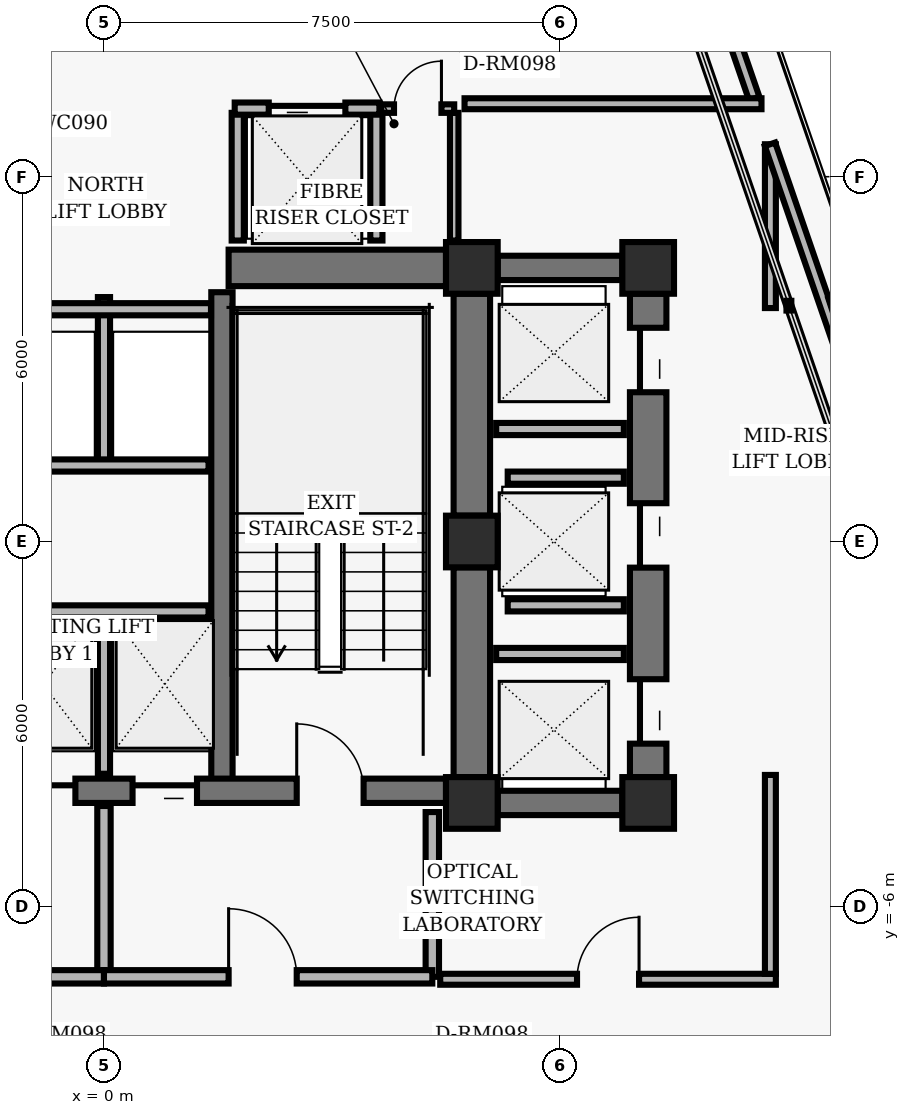
"""IFC4 building model, lengths in metres.
Left out: names, types, materials, properties, quantities, classifications, styles, units other than length and angle.
Written with IfcOpenShell. Run it as: python <this file> out.ifc"""

import sys

from ifc_helpers import new_model, si_unit, direction, frame, frame_2d, origin, origin_2d, place, context, subcontext, project, spatial, rectangle, hollow_rectangle, extrude, element, fill, save


model = new_model("IFC4")
c1 = context("Model", 3, precision=1e-05, world=origin(), true_north=direction((0.0, 1.0)))
c2 = subcontext(c1, "Body", "Model", "MODEL_VIEW")
j1 = project(units=[si_unit("LENGTHUNIT", "METRE"), si_unit("PLANEANGLEUNIT", "RADIAN")], contexts=[c1])
p1 = place(None, origin())
s1 = spatial("IfcSite", under=j1, at=p1, CompositionType="ELEMENT")
p2 = place(p1, origin())
s2 = spatial("IfcBuilding", under=s1, at=p2, CompositionType="ELEMENT")
p3 = place(p2, frame((0.0, 0.0, 150.24)))
s3 = spatial("IfcBuildingStorey", under=s2, at=p3, CompositionType="ELEMENT", Elevation=150.24)
for number, where, z_axis, x_axis in (
    (1, (6.05, 4.5, 0.0), (0.0, 0.0, 1.0), (1.0, 0.0, 0.0)),
    (2, (6.05, 0.0, 0.0), (0.0, 0.0, 1.0), (1.0, 0.0, 0.0)),
    (3, (6.05, -4.3, 0.0), (0.0, 0.0, 1.0), (1.0, 0.0, 0.0)),
    (4, (8.95, 4.5, 0.0), (0.0, 0.0, 1.0), (1.0, 0.0, 0.0)),
    (5, (8.95, -4.3, 0.0), (0.0, 0.0, 1.0), (1.0, 0.0, 0.0)),
):
    element("IfcColumn", number, at=place(p3, frame(where, z_axis=z_axis, x_axis=x_axis)), inside=s3, PredefinedType="COLUMN", context=c2, shape_type="SweptSolid", body=[
        extrude(hollow_rectangle(XDim=0.85, YDim=0.85, WallThickness=0.055, InnerFilletRadius=0.02, OuterFilletRadius=0.04, at=origin_2d()), origin(), (0.0, 0.0, 1.0), 3.04),
    ])
p4 = place(p3, frame((6.05, 0.425, 0.0), z_axis=(0.0, 0.0, 1.0), x_axis=(0.0, 1.0, 0.0)))
e6 = element("IfcWall", 6, at=p4, inside=s3, PredefinedType="SHEAR", context=c2, shape_type="SweptSolid", body=[
    extrude(rectangle(XDim=3.65, YDim=0.6, at=frame_2d((1.825, 0.0))), origin(), (0.0, 0.0, 1.0), 2.788),
])
p5 = place(p3, frame((6.05, -3.875, 0.0), z_axis=(0.0, 0.0, 1.0), x_axis=(0.0, 1.0, 0.0)))
e7 = element("IfcWall", 7, at=p5, inside=s3, PredefinedType="SHEAR", context=c2, shape_type="SweptSolid", body=[
    extrude(rectangle(XDim=3.45, YDim=0.6, at=frame_2d((1.725, 0.0))), origin(), (0.0, 0.0, 1.0), 2.788),
])
p6 = place(p3, frame((1.94, -4.1, 0.0), z_axis=(0.0, 0.0, 1.0), x_axis=(0.0, 1.0, 0.0)))
e8 = element("IfcWall", 8, at=p6, inside=s3, PredefinedType="SHEAR", context=c2, shape_type="SweptSolid", body=[
    extrude(rectangle(XDim=8.2, YDim=0.35, at=frame_2d((4.1, 0.0))), origin(), (0.0, 0.0, 1.0), 2.788),
])
p7 = place(p3, frame((-5.625, -4.1, 0.0), z_axis=(0.0, 0.0, 1.0), x_axis=(1.0, 0.0, 0.0)))
e9 = element("IfcWall", 9, at=p7, inside=s3, PredefinedType="SHEAR", context=c2, shape_type="SweptSolid", body=[
    extrude(rectangle(XDim=11.25, YDim=0.4, at=frame_2d((5.625, 0.0))), origin(), (0.0, 0.0, 1.0), 2.788),
])
p8 = place(p7, frame((1.355, 0.0, 0.0)))
e10 = element("IfcOpeningElement", 10, at=p8, cuts=e9, PredefinedType="OPENING", context=c2, shape_type="SweptSolid", body=[
    extrude(rectangle(XDim=1.1, YDim=2.04, at=frame_2d((0.55, 1.02))), frame((0.0, 0.21, 0.0), z_axis=(0.0, -1.0, 0.0), x_axis=(1.0, 0.0, 0.0)), (0.0, 0.0, 1.0), 0.42),
])
p9 = place(p7, frame((8.795, 0.0, 0.0)))
e11 = element("IfcOpeningElement", 11, at=p9, cuts=e9, PredefinedType="OPENING", context=c2, shape_type="SweptSolid", body=[
    extrude(rectangle(XDim=1.1, YDim=2.04, at=frame_2d((0.55, 1.02))), frame((0.0, 0.21, 0.0), z_axis=(0.0, -1.0, 0.0), x_axis=(1.0, 0.0, 0.0)), (0.0, 0.0, 1.0), 0.42),
])
p10 = place(p7, frame((4.095, 0.0, 0.0)))
e12 = element("IfcOpeningElement", 12, at=p10, cuts=e9, PredefinedType="OPENING", context=c2, shape_type="SweptSolid", body=[
    extrude(rectangle(XDim=1.06, YDim=2.04, at=frame_2d((0.53, 1.02))), frame((0.0, 0.21, 0.0), z_axis=(0.0, -1.0, 0.0), x_axis=(1.0, 0.0, 0.0)), (0.0, 0.0, 1.0), 0.42),
])
p11 = place(p7, frame((6.095, 0.0, 0.0)))
e13 = element("IfcOpeningElement", 13, at=p11, cuts=e9, PredefinedType="OPENING", context=c2, shape_type="SweptSolid", body=[
    extrude(rectangle(XDim=1.06, YDim=2.04, at=frame_2d((0.53, 1.02))), frame((0.0, 0.21, 0.0), z_axis=(0.0, -1.0, 0.0), x_axis=(1.0, 0.0, 0.0)), (0.0, 0.0, 1.0), 0.42),
])
p12 = place(p3, frame((2.05, 4.5, 0.0), z_axis=(0.0, 0.0, 1.0), x_axis=(1.0, 0.0, 0.0)))
e14 = element("IfcWall", 14, at=p12, inside=s3, PredefinedType="SHEAR", context=c2, shape_type="SweptSolid", body=[
    extrude(rectangle(XDim=3.575, YDim=0.6, at=frame_2d((1.788, 0.0))), origin(), (0.0, 0.0, 1.0), 2.788),
])
p13 = place(p3, frame((8.95, -3.875, 0.0), z_axis=(0.0, 0.0, 1.0), x_axis=(0.0, 1.0, 0.0)))
e15 = element("IfcWall", 15, at=p13, inside=s3, PredefinedType="SHEAR", context=c2, shape_type="SweptSolid", body=[
    extrude(rectangle(XDim=7.95, YDim=0.6, at=frame_2d((3.975, 0.0))), origin(), (0.0, 0.0, 1.0), 2.788),
])
p14 = place(p13, frame((0.55, 0.0, 0.0)))
e16 = element("IfcOpeningElement", 16, at=p14, cuts=e15, PredefinedType="OPENING", context=c2, shape_type="SweptSolid", body=[
    extrude(rectangle(XDim=1.06, YDim=2.04, at=frame_2d((0.53, 1.02))), frame((0.0, 0.31, 0.0), z_axis=(0.0, -1.0, 0.0), x_axis=(1.0, 0.0, 0.0)), (0.0, 0.0, 1.0), 0.62),
])
p15 = place(p13, frame((3.445, 0.0, 0.0)))
e17 = element("IfcOpeningElement", 17, at=p15, cuts=e15, PredefinedType="OPENING", context=c2, shape_type="SweptSolid", body=[
    extrude(rectangle(XDim=1.06, YDim=2.04, at=frame_2d((0.53, 1.02))), frame((0.0, 0.31, 0.0), z_axis=(0.0, -1.0, 0.0), x_axis=(1.0, 0.0, 0.0)), (0.0, 0.0, 1.0), 0.62),
])
p16 = place(p13, frame((6.33, 0.0, 0.0)))
e18 = element("IfcOpeningElement", 18, at=p16, cuts=e15, PredefinedType="OPENING", context=c2, shape_type="SweptSolid", body=[
    extrude(rectangle(XDim=1.06, YDim=2.04, at=frame_2d((0.53, 1.02))), frame((0.0, 0.31, 0.0), z_axis=(0.0, -1.0, 0.0), x_axis=(1.0, 0.0, 0.0)), (0.0, 0.0, 1.0), 0.62),
])
for number, where, z_axis, x_axis in (
    (19, (6.475, 4.5, 0.0), (0.0, 0.0, 1.0), (1.0, 0.0, 0.0)),
    (20, (6.475, -4.3, 0.0), (0.0, 0.0, 1.0), (1.0, 0.0, 0.0)),
):
    element("IfcWall", number, at=place(p3, frame(where, z_axis=z_axis, x_axis=x_axis)), inside=s3, PredefinedType="SHEAR", context=c2, shape_type="SweptSolid", body=[
        extrude(rectangle(XDim=2.05, YDim=0.4, at=frame_2d((1.025, 0.0))), origin(), (0.0, 0.0, 1.0), 2.788),
    ])
p17 = place(p3, frame((0.0, -3.82, 0.0), z_axis=(0.0, 0.0, 1.0), x_axis=(0.0, 1.0, 0.0)))
e21 = element("IfcWall", 21, at=p17, inside=s3, PredefinedType="PARTITIONING", context=c2, shape_type="SweptSolid", body=[
    extrude(rectangle(XDim=2.67, YDim=0.2, at=frame_2d((1.335, 0.0))), origin(), (0.0, 0.0, 1.0), 2.763),
])
p18 = place(p3, frame((-1.72, -1.15, 0.0), z_axis=(0.0, 0.0, 1.0), x_axis=(1.0, 0.0, 0.0)))
e22 = element("IfcWall", 22, at=p18, inside=s3, PredefinedType="PARTITIONING", context=c2, shape_type="SweptSolid", body=[
    extrude(rectangle(XDim=3.44, YDim=0.2, at=frame_2d((1.72, 0.0))), origin(), (0.0, 0.0, 1.0), 2.763),
])
p19 = place(p3, frame((5.4, -7.16, 0.0), z_axis=(0.0, 0.0, 1.0), x_axis=(0.0, 1.0, 0.0)))
e23 = element("IfcWall", 23, at=p19, inside=s3, PredefinedType="PARTITIONING", context=c2, shape_type="SweptSolid", body=[
    extrude(rectangle(XDim=2.71, YDim=0.22, at=frame_2d((1.355, 0.0))), origin(), (0.0, 0.0, 1.0), 2.763),
])
p20 = place(p3, frame((0.0, -7.16, 0.0), z_axis=(0.0, 0.0, 1.0), x_axis=(0.0, 1.0, 0.0)))
e24 = element("IfcWall", 24, at=p20, inside=s3, PredefinedType="PARTITIONING", context=c2, shape_type="SweptSolid", body=[
    extrude(rectangle(XDim=2.81, YDim=0.22, at=frame_2d((1.405, 0.0))), origin(), (0.0, 0.0, 1.0), 2.763),
])
p21 = place(p3, frame((-5.4, -7.16, 0.0), z_axis=(0.0, 0.0, 1.0), x_axis=(1.0, 0.0, 0.0)))
e25 = element("IfcWall", 25, at=p21, inside=s3, PredefinedType="PARTITIONING", context=c2, shape_type="SweptSolid", body=[
    extrude(rectangle(XDim=5.4, YDim=0.22, at=frame_2d((2.7, 0.0))), origin(), (0.0, 0.0, 1.0), 2.33),
])
p22 = place(p21, frame((2.05, 0.0, 0.0)))
e26 = element("IfcOpeningElement", 26, at=p22, cuts=e25, PredefinedType="OPENING", context=c2, shape_type="SweptSolid", body=[
    extrude(rectangle(XDim=1.12, YDim=2.02, at=frame_2d((0.56, 1.01))), frame((0.0, 0.12, 0.0), z_axis=(0.0, -1.0, 0.0), x_axis=(1.0, 0.0, 0.0)), (0.0, 0.0, 1.0), 0.24),
])
p23 = place(p3, frame((0.0, -7.16, 0.0), z_axis=(0.0, 0.0, 1.0), x_axis=(1.0, 0.0, 0.0)))
e27 = element("IfcWall", 27, at=p23, inside=s3, PredefinedType="PARTITIONING", context=c2, shape_type="SweptSolid", body=[
    extrude(rectangle(XDim=5.4, YDim=0.22, at=frame_2d((2.7, 0.0))), origin(), (0.0, 0.0, 1.0), 2.33),
])
p24 = place(p23, frame((2.05, 0.0, 0.0)))
e28 = element("IfcOpeningElement", 28, at=p24, cuts=e27, PredefinedType="OPENING", context=c2, shape_type="SweptSolid", body=[
    extrude(rectangle(XDim=1.12, YDim=2.02, at=frame_2d((0.56, 1.01))), frame((0.0, 0.12, 0.0), z_axis=(0.0, -1.0, 0.0), x_axis=(1.0, 0.0, 0.0)), (0.0, 0.0, 1.0), 0.24),
])
p25 = place(p3, frame((0.0, 1.25, 0.0), z_axis=(0.0, 0.0, 1.0), x_axis=(0.0, 1.0, 0.0)))
e29 = element("IfcWall", 29, at=p25, inside=s3, PredefinedType="PARTITIONING", context=c2, shape_type="SweptSolid", body=[
    extrude(rectangle(XDim=2.77, YDim=0.2, at=frame_2d((1.385, 0.0))), origin(), (0.0, 0.0, 1.0), 2.763),
])
p26 = place(p3, frame((-1.72, 1.25, 0.0), z_axis=(0.0, 0.0, 1.0), x_axis=(1.0, 0.0, 0.0)))
e30 = element("IfcWall", 30, at=p26, inside=s3, PredefinedType="PARTITIONING", context=c2, shape_type="SweptSolid", body=[
    extrude(rectangle(XDim=3.44, YDim=0.2, at=frame_2d((1.72, 0.0))), origin(), (0.0, 0.0, 1.0), 2.763),
])
p27 = place(p3, frame((-1.76, 3.82, 0.0), z_axis=(0.0, 0.0, 1.0), x_axis=(1.0, 0.0, 0.0)))
e31 = element("IfcWall", 31, at=p27, inside=s3, PredefinedType="PARTITIONING", context=c2, shape_type="SweptSolid", body=[
    extrude(rectangle(XDim=3.52, YDim=0.2, at=frame_2d((1.76, 0.0))), origin(), (0.0, 0.0, 1.0), 2.763),
])
for number, where, z_axis, x_axis in (
    (32, (2.2, 4.95, 0.0), (0.0, 0.0, 1.0), (0.0, 1.0, 0.0)),
    (33, (4.48, 4.95, 0.0), (0.0, 0.0, 1.0), (0.0, 1.0, 0.0)),
):
    element("IfcWall", number, at=place(p3, frame(where, z_axis=z_axis, x_axis=x_axis)), inside=s3, PredefinedType="PARTITIONING", context=c2, shape_type="SweptSolid", body=[
        extrude(rectangle(XDim=2.1, YDim=0.2, at=frame_2d((1.05, 0.0))), origin(), (0.0, 0.0, 1.0), 2.763),
    ])
p28 = place(p3, frame((2.15, 7.12, 0.0), z_axis=(0.0, 0.0, 1.0), x_axis=(1.0, 0.0, 0.0)))
e34 = element("IfcWall", 34, at=p28, inside=s3, PredefinedType="PARTITIONING", context=c2, shape_type="SweptSolid", body=[
    extrude(rectangle(XDim=2.38, YDim=0.2, at=frame_2d((1.19, 0.0))), origin(), (0.0, 0.0, 1.0), 2.763),
])
p29 = place(p28, frame((0.56, 0.0, 0.0)))
e35 = element("IfcOpeningElement", 35, at=p29, cuts=e34, PredefinedType="OPENING", context=c2, shape_type="SweptSolid", body=[
    extrude(rectangle(XDim=1.26, YDim=2.06, at=frame_2d((0.63, 1.03))), frame((0.0, 0.11, 0.0), z_axis=(0.0, -1.0, 0.0), x_axis=(1.0, 0.0, 0.0)), (0.0, 0.0, 1.0), 0.22),
])
p30 = place(p3, frame((5.76, 4.95, 0.0), z_axis=(0.0, 0.0, 1.0), x_axis=(0.0, 1.0, 0.0)))
e36 = element("IfcWall", 36, at=p30, inside=s3, PredefinedType="PARTITIONING", context=c2, shape_type="SweptSolid", body=[
    extrude(rectangle(XDim=2.1, YDim=0.14, at=frame_2d((1.05, 0.0))), origin(), (0.0, 0.0, 1.0), 2.763),
])
p31 = place(p3, frame((4.56, 7.12, 0.0), z_axis=(0.0, 0.0, 1.0), x_axis=(1.0, 0.0, 0.0)))
e37 = element("IfcWall", 37, at=p31, inside=s3, PredefinedType="PARTITIONING", context=c2, shape_type="SweptSolid", body=[
    extrude(rectangle(XDim=1.2, YDim=0.14, at=frame_2d((0.6, 0.0))), origin(), (0.0, 0.0, 1.0), 2.763),
])
p32 = place(p31, frame((0.21, 0.0, 0.0)))
e38 = element("IfcOpeningElement", 38, at=p32, cuts=e37, PredefinedType="OPENING", context=c2, shape_type="SweptSolid", body=[
    extrude(rectangle(XDim=0.78, YDim=2.01, at=frame_2d((0.39, 1.005))), frame((0.0, 0.08, 0.0), z_axis=(0.0, -1.0, 0.0), x_axis=(1.0, 0.0, 0.0)), (0.0, 0.0, 1.0), 0.16),
])
for number, where, z_axis, x_axis in (
    (39, (6.45, -1.85, 0.0), (0.0, 0.0, 1.0), (1.0, 0.0, 0.0)),
    (40, (6.45, 1.85, 0.0), (0.0, 0.0, 1.0), (1.0, 0.0, 0.0)),
):
    element("IfcWall", number, at=place(p3, frame(where, z_axis=z_axis, x_axis=x_axis)), inside=s3, PredefinedType="PARTITIONING", context=c2, shape_type="SweptSolid", body=[
        extrude(rectangle(XDim=2.1, YDim=0.2, at=frame_2d((1.05, 0.0))), origin(), (0.0, 0.0, 1.0), 2.763),
    ])
for number, where, z_axis, x_axis in (
    (41, (6.64, -1.05, 0.0), (0.0, 0.0, 1.0), (1.0, 0.0, 0.0)),
    (42, (6.64, 1.05, 0.0), (0.0, 0.0, 1.0), (1.0, 0.0, 0.0)),
):
    element("IfcWall", number, at=place(p3, frame(where, z_axis=z_axis, x_axis=x_axis)), inside=s3, PredefinedType="PARTITIONING", context=c2, shape_type="SweptSolid", body=[
        extrude(rectangle(XDim=1.91, YDim=0.2, at=frame_2d((0.955, 0.0))), origin(), (0.0, 0.0, 1.0), 2.763),
    ])
p33 = place(p3, frame((10.082, 9.065, 0.0), z_axis=(0.0, 0.0, 1.0), x_axis=(0.325550958337, -0.945524496524, 0.0)))
e43 = element("IfcWall", 43, at=p33, inside=s3, PredefinedType="PARTITIONING", context=c2, shape_type="SweptSolid", body=[
    extrude(rectangle(XDim=1.882, YDim=0.18, at=frame_2d((0.941, 0.0))), origin(), (0.0, 0.0, 1.0), 2.763),
])
p34 = place(p3, frame((10.814, 7.2, 0.0), z_axis=(0.0, 0.0, 1.0), x_axis=(-1.0, 0.0, 0.0)))
e44 = element("IfcWall", 44, at=p34, inside=s3, PredefinedType="PARTITIONING", context=c2, shape_type="SweptSolid", body=[
    extrude(rectangle(XDim=4.884, YDim=0.18, at=frame_2d((2.442, 0.0))), origin(), (0.0, 0.0, 1.0), 2.763),
])
p35 = place(p3, frame((5.53, -7.2, 0.0), z_axis=(0.0, 0.0, 1.0), x_axis=(1.0, 0.0, 0.0)))
e45 = element("IfcWall", 45, at=p35, inside=s3, PredefinedType="PARTITIONING", context=c2, shape_type="SweptSolid", body=[
    extrude(rectangle(XDim=5.52, YDim=0.18, at=frame_2d((2.76, 0.0))), origin(), (0.0, 0.0, 1.0), 2.33),
])
p36 = place(p35, frame((2.25, 0.0, 0.0)))
e46 = element("IfcOpeningElement", 46, at=p36, cuts=e45, PredefinedType="OPENING", context=c2, shape_type="SweptSolid", body=[
    extrude(rectangle(XDim=1.02, YDim=2.02, at=frame_2d((0.51, 1.01))), frame((0.0, 0.1, 0.0), z_axis=(0.0, -1.0, 0.0), x_axis=(1.0, 0.0, 0.0)), (0.0, 0.0, 1.0), 0.2),
])
p37 = place(p3, frame((10.96, -7.11, 0.0), z_axis=(0.0, 0.0, 1.0), x_axis=(0.0, 1.0, 0.0)))
e47 = element("IfcWall", 47, at=p37, inside=s3, PredefinedType="PARTITIONING", context=c2, shape_type="SweptSolid", body=[
    extrude(rectangle(XDim=3.271, YDim=0.18, at=frame_2d((1.635, 0.0))), origin(), (0.0, 0.0, 1.0), 2.763),
])
p38 = place(p3, frame((10.96, 3.84, 0.0), z_axis=(0.0, 0.0, 1.0), x_axis=(0.0, 1.0, 0.0)))
e48 = element("IfcWall", 48, at=p38, inside=s3, PredefinedType="PARTITIONING", context=c2, shape_type="SweptSolid", body=[
    extrude(rectangle(XDim=2.694, YDim=0.18, at=frame_2d((1.347, 0.0))), origin(), (0.0, 0.0, 1.0), 2.33),
])
p39 = place(p3, frame((10.954, 6.533, 0.0), z_axis=(0.0, 0.0, 1.0), x_axis=(0.325553439946, -0.945523642084, 0.0)))
e49 = element("IfcWall", 49, at=p39, inside=s3, PredefinedType="PARTITIONING", context=c2, shape_type="SweptSolid", body=[
    extrude(rectangle(XDim=11.22, YDim=0.18, at=frame_2d((5.61, 0.0))), origin(), (0.0, 0.0, 1.0), 2.763),
])
p40 = place(p3, frame((11.95, 3.883, 0.0), z_axis=(0.0, 0.0, 1.0), x_axis=(0.951055346906, 0.309020593362, 0.0)))
e50 = element("IfcWall", 50, at=p40, inside=s3, PredefinedType="PARTITIONING", context=c2, shape_type="SweptSolid", body=[
    extrude(rectangle(XDim=0.59, YDim=0.24, at=frame_2d((0.295, 0.0))), origin(), (0.0, 0.0, 1.0), 2.763),
])
p41 = place(p9, origin())
e51 = element("IfcDoor", 51, at=p41, inside=s3, OperationType="SINGLE_SWING_LEFT", PredefinedType="DOOR", context=c2, shape_type="SweptSolid", body=[
    extrude(rectangle(XDim=1.1, YDim=2.04, at=frame_2d((0.55, 1.02))), frame((0.0, 0.025, 0.0), z_axis=(0.0, -1.0, 0.0), x_axis=(1.0, 0.0, 0.0)), (0.0, 0.0, 1.0), 0.05),
])
fill(e11, e51)
p42 = place(p10, origin())
e52 = element("IfcDoor", 52, at=p42, inside=s3, OperationType="SLIDING_TO_LEFT", PredefinedType="DOOR", context=c2, shape_type="SweptSolid", body=[
    extrude(rectangle(XDim=1.06, YDim=2.04, at=frame_2d((0.53, 1.02))), frame((0.0, 0.025, 0.0), z_axis=(0.0, -1.0, 0.0), x_axis=(1.0, 0.0, 0.0)), (0.0, 0.0, 1.0), 0.05),
])
fill(e12, e52)
p43 = place(p11, origin())
e53 = element("IfcDoor", 53, at=p43, inside=s3, OperationType="SLIDING_TO_RIGHT", PredefinedType="DOOR", context=c2, shape_type="SweptSolid", body=[
    extrude(rectangle(XDim=1.06, YDim=2.04, at=frame_2d((0.53, 1.02))), frame((0.0, 0.025, 0.0), z_axis=(0.0, -1.0, 0.0), x_axis=(1.0, 0.0, 0.0)), (0.0, 0.0, 1.0), 0.05),
])
fill(e13, e53)
p44 = place(p24, origin())
e54 = element("IfcDoor", 54, at=p44, inside=s3, OperationType="SINGLE_SWING_LEFT", PredefinedType="DOOR", context=c2, shape_type="SweptSolid", body=[
    extrude(rectangle(XDim=1.12, YDim=2.02, at=frame_2d((0.56, 1.01))), frame((0.0, 0.025, 0.0), z_axis=(0.0, -1.0, 0.0), x_axis=(1.0, 0.0, 0.0)), (0.0, 0.0, 1.0), 0.05),
])
fill(e28, e54)
p45 = place(p29, origin())
e55 = element("IfcDoor", 55, at=p45, inside=s3, OperationType="SLIDING_TO_LEFT", PredefinedType="DOOR", context=c2, shape_type="SweptSolid", body=[
    extrude(rectangle(XDim=1.26, YDim=2.06, at=frame_2d((0.63, 1.03))), frame((0.0, 0.025, 0.0), z_axis=(0.0, -1.0, 0.0), x_axis=(1.0, 0.0, 0.0)), (0.0, 0.0, 1.0), 0.05),
])
fill(e35, e55)
p46 = place(p32, origin())
e56 = element("IfcDoor", 56, at=p46, inside=s3, OperationType="SINGLE_SWING_RIGHT", PredefinedType="DOOR", context=c2, shape_type="SweptSolid", body=[
    extrude(rectangle(XDim=0.78, YDim=2.01, at=frame_2d((0.39, 1.005))), frame((0.0, 0.025, 0.0), z_axis=(0.0, -1.0, 0.0), x_axis=(1.0, 0.0, 0.0)), (0.0, 0.0, 1.0), 0.05),
])
fill(e38, e56)
p47 = place(p14, origin())
e57 = element("IfcDoor", 57, at=p47, inside=s3, OperationType="SLIDING_TO_LEFT", PredefinedType="DOOR", context=c2, shape_type="SweptSolid", body=[
    extrude(rectangle(XDim=1.06, YDim=2.04, at=frame_2d((0.53, 1.02))), frame((0.0, 0.025, 0.0), z_axis=(0.0, -1.0, 0.0), x_axis=(1.0, 0.0, 0.0)), (0.0, 0.0, 1.0), 0.05),
])
fill(e16, e57)
p48 = place(p15, origin())
e58 = element("IfcDoor", 58, at=p48, inside=s3, OperationType="SLIDING_TO_RIGHT", PredefinedType="DOOR", context=c2, shape_type="SweptSolid", body=[
    extrude(rectangle(XDim=1.06, YDim=2.04, at=frame_2d((0.53, 1.02))), frame((0.0, 0.025, 0.0), z_axis=(0.0, -1.0, 0.0), x_axis=(1.0, 0.0, 0.0)), (0.0, 0.0, 1.0), 0.05),
])
fill(e17, e58)
p49 = place(p16, origin())
e59 = element("IfcDoor", 59, at=p49, inside=s3, OperationType="SLIDING_TO_LEFT", PredefinedType="DOOR", context=c2, shape_type="SweptSolid", body=[
    extrude(rectangle(XDim=1.06, YDim=2.04, at=frame_2d((0.53, 1.02))), frame((0.0, 0.025, 0.0), z_axis=(0.0, -1.0, 0.0), x_axis=(1.0, 0.0, 0.0)), (0.0, 0.0, 1.0), 0.05),
])
fill(e18, e59)
p50 = place(p36, origin())
e60 = element("IfcDoor", 60, at=p50, inside=s3, OperationType="SINGLE_SWING_RIGHT", PredefinedType="DOOR", context=c2, shape_type="SweptSolid", body=[
    extrude(rectangle(XDim=1.02, YDim=2.02, at=frame_2d((0.51, 1.01))), frame((0.0, 0.025, 0.0), z_axis=(0.0, -1.0, 0.0), x_axis=(1.0, 0.0, 0.0)), (0.0, 0.0, 1.0), 0.05),
])
fill(e46, e60)
save(model, sys.argv[1])
